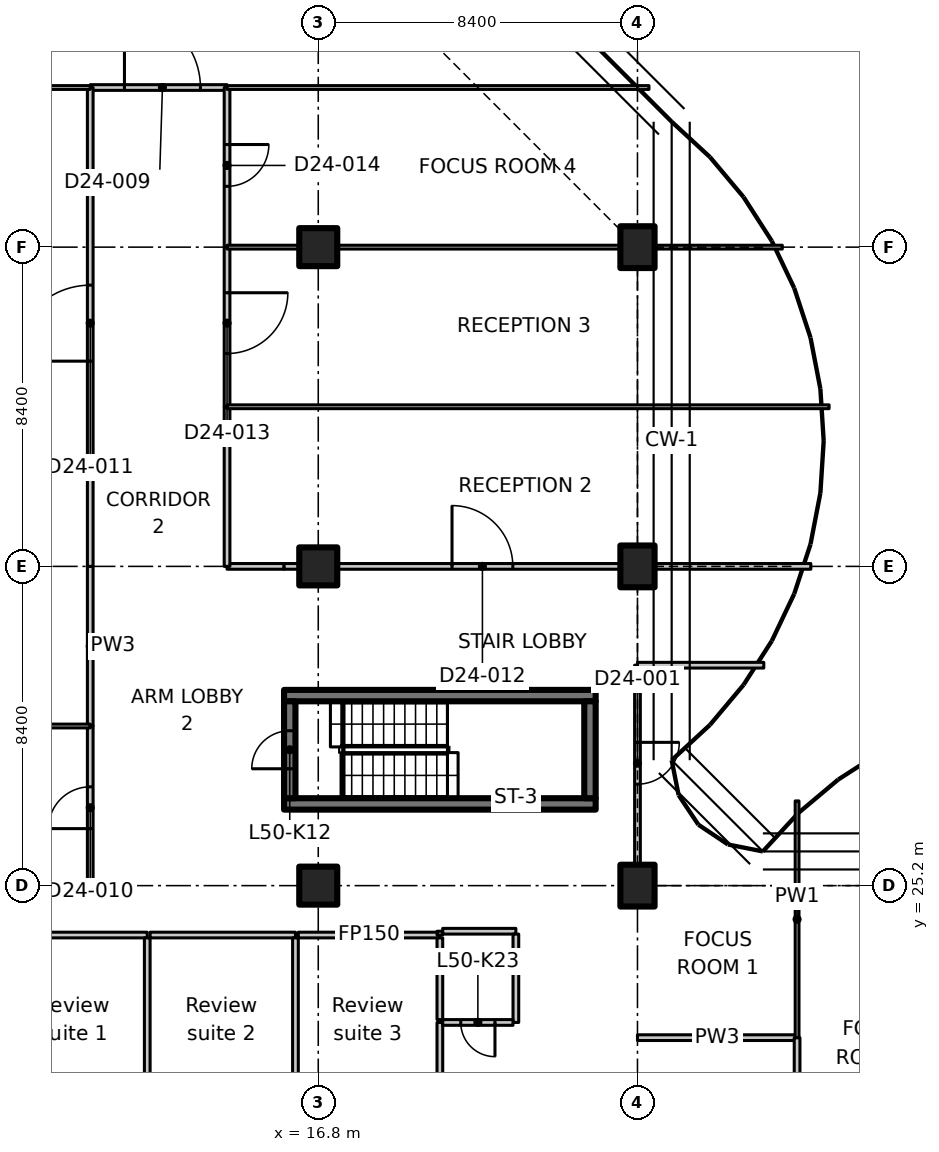
"""IFC4 building model, lengths in metres.
Left out: names, types, materials, properties, quantities, classifications, styles, units other than length and angle.
Written with IfcOpenShell. Run it as: python <this file> out.ifc"""

import sys

from ifc_helpers import new_model, si_unit, direction, frame, frame_2d, origin, origin_2d, place, context, subcontext, project, spatial, polyline, rectangle, outline, extrude, element, fill, save


model = new_model("IFC4")
c1 = context("Model", 3, precision=1e-05, world=origin(), true_north=direction((0.0, 1.0)))
c2 = subcontext(c1, "Body", "Model", "MODEL_VIEW")
j1 = project(units=[si_unit("LENGTHUNIT", "METRE"), si_unit("PLANEANGLEUNIT", "RADIAN")], contexts=[c1])
p1 = place(None, origin())
s1 = spatial("IfcSite", under=j1, at=p1, CompositionType="ELEMENT")
p2 = place(p1, origin())
s2 = spatial("IfcBuilding", under=s1, at=p2, CompositionType="ELEMENT")
p3 = place(p2, frame((0.0, 0.0, 199.2)))
s3 = spatial("IfcBuildingStorey", under=s2, at=p3, CompositionType="ELEMENT", Elevation=199.2)
for number, where, z_axis, x_axis in (
    (1, (16.8, 25.2, 0.0), (0.0, 0.0, 1.0), (1.0, 0.0, 0.0)),
    (2, (16.8, 33.6, 0.0), (0.0, 0.0, 1.0), (1.0, 0.0, 0.0)),
    (3, (16.8, 42.0, 0.0), (0.0, 0.0, 1.0), (1.0, 0.0, 0.0)),
):
    element("IfcColumn", number, at=place(p3, frame(where, z_axis=z_axis, x_axis=x_axis)), inside=s3, PredefinedType="COLUMN", context=c2, shape_type="SweptSolid", body=[
        extrude(rectangle(XDim=1.0, YDim=1.0, at=origin_2d()), origin(), (0.0, 0.0, 1.0), 3.35),
    ])
for number, where, z_axis, x_axis in (
    (4, (25.2, 25.2, 0.0), (0.0, 0.0, 1.0), (1.0, 0.0, 0.0)),
    (5, (25.2, 33.6, 0.0), (0.0, 0.0, 1.0), (1.0, 0.0, 0.0)),
    (6, (25.2, 42.0, 0.0), (0.0, 0.0, 1.0), (1.0, 0.0, 0.0)),
):
    element("IfcColumn", number, at=place(p3, frame(where, z_axis=z_axis, x_axis=x_axis)), inside=s3, PredefinedType="COLUMN", context=c2, shape_type="SweptSolid", body=[
        extrude(rectangle(XDim=0.9, YDim=1.1, at=origin_2d()), origin(), (0.0, 0.0, 1.0), 3.35),
    ])
for number, where, z_axis, x_axis in (
    (7, (15.9, 27.35, 0.0), (0.0, 0.0, 1.0), (1.0, 0.0, 0.0)),
    (8, (15.9, 30.2, 0.0), (0.0, 0.0, 1.0), (1.0, 0.0, 0.0)),
):
    element("IfcWall", number, at=place(p3, frame(where, z_axis=z_axis, x_axis=x_axis)), inside=s3, PredefinedType="SHEAR", context=c2, shape_type="SweptSolid", body=[
        extrude(rectangle(XDim=8.2, YDim=0.3, at=frame_2d((4.1, 0.0))), origin(), (0.0, 0.0, 1.0), 3.35),
    ])
p4 = place(p3, frame((16.05, 27.5, 0.0), z_axis=(0.0, 0.0, 1.0), x_axis=(0.0, 1.0, 0.0)))
e9 = element("IfcWall", 9, at=p4, inside=s3, PredefinedType="SHEAR", context=c2, shape_type="SweptSolid", body=[
    extrude(rectangle(XDim=2.55, YDim=0.3, at=frame_2d((1.275, 0.0))), origin(), (0.0, 0.0, 1.0), 3.35),
])
p5 = place(p4, frame((0.775, 0.0, 0.0)))
e10 = element("IfcOpeningElement", 10, at=p5, cuts=e9, PredefinedType="OPENING", context=c2, shape_type="SweptSolid", body=[
    extrude(rectangle(XDim=1.0, YDim=2.1, at=frame_2d((0.5, 1.05))), frame((0.0, 0.16, 0.0), z_axis=(0.0, -1.0, 0.0), x_axis=(1.0, 0.0, 0.0)), (0.0, 0.0, 1.0), 0.32),
])
p6 = place(p3, frame((23.95, 27.5, 0.0), z_axis=(0.0, 0.0, 1.0), x_axis=(0.0, 1.0, 0.0)))
e11 = element("IfcWall", 11, at=p6, inside=s3, PredefinedType="SHEAR", context=c2, shape_type="SweptSolid", body=[
    extrude(rectangle(XDim=2.55, YDim=0.3, at=frame_2d((1.275, 0.0))), origin(), (0.0, 0.0, 1.0), 3.35),
])
p7 = place(p3, frame((8.575, 23.9, 0.0), z_axis=(0.0, 0.0, 1.0), x_axis=(1.0, 0.0, 0.0)))
e12 = element("IfcWall", 12, at=p7, inside=s3, PredefinedType="PARTITIONING", context=c2, shape_type="SweptSolid", body=[
    extrude(rectangle(XDim=3.725, YDim=0.15, at=frame_2d((1.863, 0.0))), origin(), (0.0, 0.0, 1.0), 3.35),
])
p8 = place(p3, frame((12.3, 23.825, 0.0), z_axis=(0.0, 0.0, 1.0), x_axis=(0.0, -1.0, 0.0)))
e13 = element("IfcWall", 13, at=p8, inside=s3, PredefinedType="PARTITIONING", context=c2, shape_type="SweptSolid", body=[
    extrude(rectangle(XDim=4.35, YDim=0.15, at=frame_2d((2.175, 0.0))), origin(), (0.0, 0.0, 1.0), 3.35),
])
p9 = place(p3, frame((12.375, 23.9, 0.0), z_axis=(0.0, 0.0, 1.0), x_axis=(1.0, 0.0, 0.0)))
e14 = element("IfcWall", 14, at=p9, inside=s3, PredefinedType="PARTITIONING", context=c2, shape_type="SweptSolid", body=[
    extrude(rectangle(XDim=3.825, YDim=0.15, at=frame_2d((1.913, 0.0))), origin(), (0.0, 0.0, 1.0), 3.35),
])
p10 = place(p3, frame((20.0, 21.6, 0.0), z_axis=(0.0, 0.0, 1.0), x_axis=(0.0, -1.0, 0.0)))
e15 = element("IfcWall", 15, at=p10, inside=s3, PredefinedType="PARTITIONING", context=c2, shape_type="SweptSolid", body=[
    extrude(rectangle(XDim=2.2, YDim=0.15, at=frame_2d((1.1, 0.0))), origin(), (0.0, 0.0, 1.0), 3.35),
])
p11 = place(p3, frame((16.2, 23.825, 0.0), z_axis=(0.0, 0.0, 1.0), x_axis=(0.0, -1.0, 0.0)))
e16 = element("IfcWall", 16, at=p11, inside=s3, PredefinedType="PARTITIONING", context=c2, shape_type="SweptSolid", body=[
    extrude(rectangle(XDim=4.35, YDim=0.15, at=frame_2d((2.175, 0.0))), origin(), (0.0, 0.0, 1.0), 3.35),
])
p12 = place(p3, frame((16.275, 23.9, 0.0), z_axis=(0.0, 0.0, 1.0), x_axis=(1.0, 0.0, 0.0)))
e17 = element("IfcWall", 17, at=p12, inside=s3, PredefinedType="PARTITIONING", context=c2, shape_type="SweptSolid", body=[
    extrude(rectangle(XDim=3.725, YDim=0.15, at=frame_2d((1.863, 0.0))), origin(), (0.0, 0.0, 1.0), 3.35),
])
p13 = place(p3, frame((20.0, 23.9, 0.0), z_axis=(0.0, 0.0, 1.0), x_axis=(0.0, 1.0, 0.0)))
e18 = element("IfcWall", 18, at=p13, inside=s3, PredefinedType="PARTITIONING", context=c2, shape_type="SweptSolid", body=[
    extrude(rectangle(XDim=0.1, YDim=0.15, at=frame_2d((0.05, 0.0))), origin(), (0.0, 0.0, 1.0), 3.35),
])
p14 = place(p3, frame((20.075, 24.0, 0.0), z_axis=(0.0, 0.0, 1.0), x_axis=(1.0, 0.0, 0.0)))
e19 = element("IfcWall", 19, at=p14, inside=s3, PredefinedType="PARTITIONING", context=c2, shape_type="SweptSolid", body=[
    extrude(rectangle(XDim=1.925, YDim=0.15, at=frame_2d((0.962, 0.0))), origin(), (0.0, 0.0, 1.0), 3.35),
])
p15 = place(p3, frame((22.0, 23.925, 0.0), z_axis=(0.0, 0.0, 1.0), x_axis=(0.0, -1.0, 0.0)))
e20 = element("IfcWall", 20, at=p15, inside=s3, PredefinedType="PARTITIONING", context=c2, shape_type="SweptSolid", body=[
    extrude(rectangle(XDim=2.325, YDim=0.15, at=frame_2d((1.163, 0.0))), origin(), (0.0, 0.0, 1.0), 3.35),
])
p16 = place(p3, frame((21.925, 21.6, 0.0), z_axis=(0.0, 0.0, 1.0), x_axis=(-1.0, 0.0, 0.0)))
e21 = element("IfcWall", 21, at=p16, inside=s3, PredefinedType="PARTITIONING", context=c2, shape_type="SweptSolid", body=[
    extrude(rectangle(XDim=1.85, YDim=0.15, at=frame_2d((0.925, 0.0))), origin(), (0.0, 0.0, 1.0), 3.35),
])
p17 = place(p16, frame((0.475, 0.0, 0.0)))
e22 = element("IfcOpeningElement", 22, at=p17, cuts=e21, PredefinedType="OPENING", context=c2, shape_type="SweptSolid", body=[
    extrude(rectangle(XDim=0.9, YDim=2.1, at=frame_2d((0.45, 1.05))), frame((0.0, 0.085, 0.0), z_axis=(0.0, -1.0, 0.0), x_axis=(1.0, 0.0, 0.0)), (0.0, 0.0, 1.0), 0.17),
])
p18 = place(p3, frame((20.0, 21.675, 0.0), z_axis=(0.0, 0.0, 1.0), x_axis=(0.0, 1.0, 0.0)))
e23 = element("IfcWall", 23, at=p18, inside=s3, PredefinedType="PARTITIONING", context=c2, shape_type="SweptSolid", body=[
    extrude(rectangle(XDim=2.15, YDim=0.15, at=frame_2d((1.075, 0.0))), origin(), (0.0, 0.0, 1.0), 3.35),
])
p19 = place(p3, frame((25.2, 21.2, 0.0), z_axis=(0.0, 0.0, 1.0), x_axis=(1.0, 0.0, 0.0)))
e24 = element("IfcWall", 24, at=p19, inside=s3, PredefinedType="PARTITIONING", context=c2, shape_type="SweptSolid", body=[
    extrude(rectangle(XDim=4.2, YDim=0.15, at=frame_2d((2.1, 0.0))), origin(), (0.0, 0.0, 1.0), 3.33),
])
p20 = place(p3, frame((29.4, 21.2, 0.0), z_axis=(0.0, 0.0, 1.0), x_axis=(0.0, -1.0, 0.0)))
e25 = element("IfcWall", 25, at=p20, inside=s3, PredefinedType="PARTITIONING", context=c2, shape_type="SweptSolid", body=[
    extrude(rectangle(XDim=8.2, YDim=0.15, at=frame_2d((4.1, 0.0))), origin(), (0.0, 0.0, 1.0), 3.33),
])
p21 = place(p3, frame((29.4, 27.429, 0.0), z_axis=(0.0, 0.0, 1.0), x_axis=(0.0, -1.0, 0.0)))
e26 = element("IfcWall", 26, at=p21, inside=s3, PredefinedType="PARTITIONING", context=c2, shape_type="SweptSolid", body=[
    extrude(outline(polyline([(0.0, 0.0), (6.229, 0.0), (6.229, 3.33), (2.679, 3.33), (2.677, 2.98), (1.781, 2.98), (1.779, 3.33), (0.154, 3.33), (0.0, 3.33), (0.0, 0.0)])), frame((0.0, 0.05, 0.0), z_axis=(0.0, -1.0, 0.0), x_axis=(1.0, 0.0, 0.0)), (0.0, 0.0, 1.0), 0.1),
])
p22 = place(p3, frame((25.2, 31.0, 0.0), z_axis=(0.0, 0.0, 1.0), x_axis=(0.0, -1.0, 0.0)))
e27 = element("IfcWall", 27, at=p22, inside=s3, PredefinedType="PARTITIONING", context=c2, shape_type="SweptSolid", body=[
    extrude(outline(polyline([(0.0, 0.0), (5.23, 0.0), (5.23, 2.98), (0.0, 2.98), (0.0, 0.0)])), frame((0.0, 0.075, 0.0), z_axis=(0.0, -1.0, 0.0), x_axis=(1.0, 0.0, 0.0)), (0.0, 0.0, 1.0), 0.15),
])
p23 = place(p22, frame((2.03, 0.0, 0.0)))
e28 = element("IfcOpeningElement", 28, at=p23, cuts=e27, PredefinedType="OPENING", context=c2, shape_type="SweptSolid", body=[
    extrude(rectangle(XDim=1.1, YDim=2.1, at=frame_2d((0.55, 1.05))), frame((0.0, 0.085, 0.0), z_axis=(0.0, -1.0, 0.0), x_axis=(1.0, 0.0, 0.0)), (0.0, 0.0, 1.0), 0.17),
])
p24 = place(p3, frame((25.2, 31.0, 0.0), z_axis=(0.0, 0.0, 1.0), x_axis=(1.0, 0.0, 0.0)))
e29 = element("IfcWall", 29, at=p24, inside=s3, PredefinedType="PARTITIONING", context=c2, shape_type="SweptSolid", body=[
    extrude(rectangle(XDim=3.324, YDim=0.15, at=frame_2d((1.662, 0.0))), origin(), (0.0, 0.0, 1.0), 2.98),
])
p25 = place(p3, frame((10.8, 25.2, 0.0), z_axis=(0.0, 0.0, 1.0), x_axis=(0.0, 1.0, 0.0)))
e30 = element("IfcWall", 30, at=p25, inside=s3, PredefinedType="PARTITIONING", context=c2, shape_type="SweptSolid", body=[
    extrude(rectangle(XDim=4.2, YDim=0.15, at=frame_2d((2.1, 0.0))), origin(), (0.0, 0.0, 1.0), 3.33),
])
p26 = place(p25, frame((1.5, 0.0, 0.0)))
e31 = element("IfcOpeningElement", 31, at=p26, cuts=e30, PredefinedType="OPENING", context=c2, shape_type="SweptSolid", body=[
    extrude(rectangle(XDim=1.1, YDim=2.1, at=frame_2d((0.55, 1.05))), frame((0.0, 0.085, 0.0), z_axis=(0.0, -1.0, 0.0), x_axis=(1.0, 0.0, 0.0)), (0.0, 0.0, 1.0), 0.17),
])
p27 = place(p3, frame((10.8, 29.4, 0.0), z_axis=(0.0, 0.0, 1.0), x_axis=(0.0, 1.0, 0.0)))
e32 = element("IfcWall", 32, at=p27, inside=s3, PredefinedType="PARTITIONING", context=c2, shape_type="SweptSolid", body=[
    extrude(rectangle(XDim=4.2, YDim=0.15, at=frame_2d((2.1, 0.0))), origin(), (0.0, 0.0, 1.0), 3.33),
])
p28 = place(p3, frame((14.4, 33.6, 0.0), z_axis=(0.0, 0.0, 1.0), x_axis=(1.0, 0.0, 0.0)))
e33 = element("IfcWall", 33, at=p28, inside=s3, PredefinedType="PARTITIONING", context=c2, shape_type="SweptSolid", body=[
    extrude(rectangle(XDim=1.5, YDim=0.15, at=frame_2d((0.75, 0.0))), origin(), (0.0, 0.0, 1.0), 3.33),
])
p29 = place(p3, frame((15.9, 33.6, 0.0), z_axis=(0.0, 0.0, 1.0), x_axis=(1.0, 0.0, 0.0)))
e34 = element("IfcWall", 34, at=p29, inside=s3, PredefinedType="PARTITIONING", context=c2, shape_type="SweptSolid", body=[
    extrude(rectangle(XDim=0.38, YDim=0.15, at=frame_2d((0.19, 0.0))), origin(), (0.0, 0.0, 1.0), 3.33),
])
p30 = place(p3, frame((17.32, 33.6, 0.0), z_axis=(0.0, 0.0, 1.0), x_axis=(1.0, 0.0, 0.0)))
e35 = element("IfcWall", 35, at=p30, inside=s3, PredefinedType="PARTITIONING", context=c2, shape_type="SweptSolid", body=[
    extrude(rectangle(XDim=7.41, YDim=0.15, at=frame_2d((3.705, 0.0))), origin(), (0.0, 0.0, 1.0), 3.33),
])
p31 = place(p30, frame((3.0, 0.0, 0.0)))
e36 = element("IfcOpeningElement", 36, at=p31, cuts=e35, PredefinedType="OPENING", context=c2, shape_type="SweptSolid", body=[
    extrude(rectangle(XDim=1.6, YDim=2.1, at=frame_2d((0.8, 1.05))), frame((0.0, 0.085, 0.0), z_axis=(0.0, -1.0, 0.0), x_axis=(1.0, 0.0, 0.0)), (0.0, 0.0, 1.0), 0.17),
])
p32 = place(p3, frame((25.67, 33.6, 0.0), z_axis=(0.0, 0.0, 1.0), x_axis=(1.0, 0.0, 0.0)))
e37 = element("IfcWall", 37, at=p32, inside=s3, PredefinedType="PARTITIONING", context=c2, shape_type="SweptSolid", body=[
    extrude(rectangle(XDim=4.092, YDim=0.15, at=frame_2d((2.046, 0.0))), origin(), (0.0, 0.0, 1.0), 2.98),
])
p33 = place(p3, frame((10.8, 46.2, 0.0), z_axis=(0.0, 0.0, 1.0), x_axis=(1.0, 0.0, 0.0)))
e38 = element("IfcWall", 38, at=p33, inside=s3, PredefinedType="PARTITIONING", context=c2, shape_type="SweptSolid", body=[
    extrude(rectangle(XDim=3.6, YDim=0.15, at=frame_2d((1.8, 0.0))), origin(), (0.0, 0.0, 1.0), 3.33),
])
p34 = place(p33, frame((0.9, 0.0, 0.0)))
e39 = element("IfcOpeningElement", 39, at=p34, cuts=e38, PredefinedType="OPENING", context=c2, shape_type="SweptSolid", body=[
    extrude(rectangle(XDim=2.0, YDim=2.4, at=frame_2d((1.0, 1.2))), frame((0.0, 0.085, 0.0), z_axis=(0.0, -1.0, 0.0), x_axis=(1.0, 0.0, 0.0)), (0.0, 0.0, 1.0), 0.17),
])
p35 = place(p3, frame((10.8, 33.6, 0.0), z_axis=(0.0, 0.0, 1.0), x_axis=(0.0, 1.0, 0.0)))
e40 = element("IfcWall", 40, at=p35, inside=s3, PredefinedType="PARTITIONING", context=c2, shape_type="SweptSolid", body=[
    extrude(rectangle(XDim=12.6, YDim=0.15, at=frame_2d((6.3, 0.0))), origin(), (0.0, 0.0, 1.0), 3.33),
])
p36 = place(p35, frame((5.4, 0.0, 0.0)))
e41 = element("IfcOpeningElement", 41, at=p36, cuts=e40, PredefinedType="OPENING", context=c2, shape_type="SweptSolid", body=[
    extrude(rectangle(XDim=2.0, YDim=2.4, at=frame_2d((1.0, 1.2))), frame((0.0, 0.085, 0.0), z_axis=(0.0, -1.0, 0.0), x_axis=(1.0, 0.0, 0.0)), (0.0, 0.0, 1.0), 0.17),
])
p37 = place(p3, frame((14.4, 37.8, 0.0), z_axis=(0.0, 0.0, 1.0), x_axis=(0.0, -1.0, 0.0)))
e42 = element("IfcWall", 42, at=p37, inside=s3, PredefinedType="PARTITIONING", context=c2, shape_type="SweptSolid", body=[
    extrude(rectangle(XDim=4.2, YDim=0.15, at=frame_2d((2.1, 0.0))), origin(), (0.0, 0.0, 1.0), 3.33),
])
p38 = place(p3, frame((14.4, 42.0, 0.0), z_axis=(0.0, 0.0, 1.0), x_axis=(0.0, -1.0, 0.0)))
e43 = element("IfcWall", 43, at=p38, inside=s3, PredefinedType="PARTITIONING", context=c2, shape_type="SweptSolid", body=[
    extrude(rectangle(XDim=4.2, YDim=0.15, at=frame_2d((2.1, 0.0))), origin(), (0.0, 0.0, 1.0), 3.33),
])
p39 = place(p38, frame((1.2, 0.0, 0.0)))
e44 = element("IfcOpeningElement", 44, at=p39, cuts=e43, PredefinedType="OPENING", context=c2, shape_type="SweptSolid", body=[
    extrude(rectangle(XDim=1.6, YDim=2.1, at=frame_2d((0.8, 1.05))), frame((0.0, 0.085, 0.0), z_axis=(0.0, -1.0, 0.0), x_axis=(1.0, 0.0, 0.0)), (0.0, 0.0, 1.0), 0.17),
])
p40 = place(p3, frame((14.4, 46.2, 0.0), z_axis=(0.0, 0.0, 1.0), x_axis=(0.0, -1.0, 0.0)))
e45 = element("IfcWall", 45, at=p40, inside=s3, PredefinedType="PARTITIONING", context=c2, shape_type="SweptSolid", body=[
    extrude(rectangle(XDim=4.2, YDim=0.15, at=frame_2d((2.1, 0.0))), origin(), (0.0, 0.0, 1.0), 3.33),
])
p41 = place(p40, frame((1.5, 0.0, 0.0)))
e46 = element("IfcOpeningElement", 46, at=p41, cuts=e45, PredefinedType="OPENING", context=c2, shape_type="SweptSolid", body=[
    extrude(rectangle(XDim=1.1, YDim=2.1, at=frame_2d((0.55, 1.05))), frame((0.0, 0.085, 0.0), z_axis=(0.0, -1.0, 0.0), x_axis=(1.0, 0.0, 0.0)), (0.0, 0.0, 1.0), 0.17),
])
p42 = place(p3, frame((10.8, 46.2, 0.0), z_axis=(0.0, 0.0, 1.0), x_axis=(-1.0, 0.0, 0.0)))
e47 = element("IfcWall", 47, at=p42, inside=s3, PredefinedType="PARTITIONING", context=c2, shape_type="SweptSolid", body=[
    extrude(outline(polyline([(0.0, 0.0), (6.565, 0.0), (6.565, 3.33), (6.3, 3.33), (5.65, 3.33), (5.648, 2.98), (4.752, 2.98), (4.75, 3.33), (0.0, 3.33), (0.0, 0.0)])), frame((0.0, 0.05, 0.0), z_axis=(0.0, -1.0, 0.0), x_axis=(1.0, 0.0, 0.0)), (0.0, 0.0, 1.0), 0.1),
])
p43 = place(p3, frame((25.502, 46.2, 0.0), z_axis=(0.0, 0.0, 1.0), x_axis=(-1.0, 0.0, 0.0)))
e48 = element("IfcWall", 48, at=p43, inside=s3, PredefinedType="PARTITIONING", context=c2, shape_type="SweptSolid", body=[
    extrude(outline(polyline([(0.0, 0.0), (11.103, 0.0), (11.103, 3.33), (5.168, 3.33), (5.166, 2.98), (3.839, 2.98), (3.837, 3.33), (0.103, 3.33), (0.0, 3.33), (0.0, 0.0)])), frame((0.0, 0.05, 0.0), z_axis=(0.0, -1.0, 0.0), x_axis=(1.0, 0.0, 0.0)), (0.0, 0.0, 1.0), 0.1),
])
p44 = place(p3, frame((-1.609, 29.4, 0.0), z_axis=(0.0, 0.0, 1.0), x_axis=(1.0, 0.0, 0.0)))
e49 = element("IfcWall", 49, at=p44, inside=s3, PredefinedType="PARTITIONING", context=c2, shape_type="SweptSolid", body=[
    extrude(outline(polyline([(0.0, 0.0), (12.409, 0.0), (12.409, 3.33), (2.059, 3.33), (2.057, 2.98), (1.161, 2.98), (1.159, 3.33), (0.509, 3.33), (0.0, 3.33), (0.0, 0.0)])), frame((0.0, 0.05, 0.0), z_axis=(0.0, -1.0, 0.0), x_axis=(1.0, 0.0, 0.0)), (0.0, 0.0, 1.0), 0.1),
])
p45 = place(p3, frame((14.4, 37.8, 0.0), z_axis=(0.0, 0.0, 1.0), x_axis=(1.0, 0.0, 0.0)))
e50 = element("IfcWall", 50, at=p45, inside=s3, PredefinedType="PARTITIONING", context=c2, shape_type="SweptSolid", body=[
    extrude(outline(polyline([(0.0, 0.0), (15.843, 0.0), (15.843, 3.33), (11.25, 3.33), (11.248, 2.98), (10.352, 2.98), (10.35, 3.33), (0.0, 3.33), (0.0, 0.0)])), frame((0.0, 0.05, 0.0), z_axis=(0.0, -1.0, 0.0), x_axis=(1.0, 0.0, 0.0)), (0.0, 0.0, 1.0), 0.1),
])
p46 = place(p3, frame((14.4, 42.0, 0.0), z_axis=(0.0, 0.0, 1.0), x_axis=(1.0, 0.0, 0.0)))
e51 = element("IfcWall", 51, at=p46, inside=s3, PredefinedType="PARTITIONING", context=c2, shape_type="SweptSolid", body=[
    extrude(rectangle(XDim=1.88, YDim=0.1, at=frame_2d((0.94, 0.0))), origin(), (0.0, 0.0, 1.0), 3.33),
])
p47 = place(p3, frame((17.32, 42.0, 0.0), z_axis=(0.0, 0.0, 1.0), x_axis=(1.0, 0.0, 0.0)))
e52 = element("IfcWall", 52, at=p47, inside=s3, PredefinedType="PARTITIONING", context=c2, shape_type="SweptSolid", body=[
    extrude(outline(polyline([(0.0, 0.0), (7.41, 0.0), (7.41, 2.98), (7.216, 2.98), (7.214, 3.33), (0.0, 3.33), (0.0, 0.0)])), frame((0.0, 0.05, 0.0), z_axis=(0.0, -1.0, 0.0), x_axis=(1.0, 0.0, 0.0)), (0.0, 0.0, 1.0), 0.1),
])
p48 = place(p3, frame((25.67, 42.0, 0.0), z_axis=(0.0, 0.0, 1.0), x_axis=(1.0, 0.0, 0.0)))
e53 = element("IfcWall", 53, at=p48, inside=s3, PredefinedType="PARTITIONING", context=c2, shape_type="SweptSolid", body=[
    extrude(rectangle(XDim=3.342, YDim=0.1, at=frame_2d((1.671, 0.0))), origin(), (0.0, 0.0, 1.0), 2.98),
])
p49 = place(p5, origin())
e54 = element("IfcDoor", 54, at=p49, inside=s3, OperationType="SINGLE_SWING_LEFT", PredefinedType="DOOR", context=c2, shape_type="SweptSolid", body=[
    extrude(rectangle(XDim=1.0, YDim=2.1, at=frame_2d((0.5, 1.05))), frame((0.0, 0.025, 0.0), z_axis=(0.0, -1.0, 0.0), x_axis=(1.0, 0.0, 0.0)), (0.0, 0.0, 1.0), 0.05),
])
fill(e10, e54)
p50 = place(p17, origin())
e55 = element("IfcDoor", 55, at=p50, inside=s3, OperationType="SINGLE_SWING_RIGHT", PredefinedType="DOOR", context=c2, shape_type="SweptSolid", body=[
    extrude(rectangle(XDim=0.9, YDim=2.1, at=frame_2d((0.45, 1.05))), frame((0.0, 0.025, 0.0), z_axis=(0.0, -1.0, 0.0), x_axis=(1.0, 0.0, 0.0)), (0.0, 0.0, 1.0), 0.05),
])
fill(e22, e55)
p51 = place(p23, origin())
e56 = element("IfcDoor", 56, at=p51, inside=s3, OperationType="SINGLE_SWING_RIGHT", PredefinedType="DOOR", context=c2, shape_type="SweptSolid", body=[
    extrude(rectangle(XDim=1.1, YDim=2.1, at=frame_2d((0.55, 1.05))), frame((0.0, 0.025, 0.0), z_axis=(0.0, -1.0, 0.0), x_axis=(1.0, 0.0, 0.0)), (0.0, 0.0, 1.0), 0.05),
])
fill(e28, e56)
p52 = place(p34, origin())
e57 = element("IfcDoor", 57, at=p52, inside=s3, OperationType="DOUBLE_DOOR_SINGLE_SWING", PredefinedType="DOOR", context=c2, shape_type="SweptSolid", body=[
    extrude(rectangle(XDim=2.0, YDim=2.4, at=frame_2d((1.0, 1.2))), frame((0.0, 0.025, 0.0), z_axis=(0.0, -1.0, 0.0), x_axis=(1.0, 0.0, 0.0)), (0.0, 0.0, 1.0), 0.05),
])
fill(e39, e57)
p53 = place(p26, origin())
e58 = element("IfcDoor", 58, at=p53, inside=s3, OperationType="SINGLE_SWING_LEFT", PredefinedType="DOOR", context=c2, shape_type="SweptSolid", body=[
    extrude(rectangle(XDim=1.1, YDim=2.1, at=frame_2d((0.55, 1.05))), frame((0.0, 0.025, 0.0), z_axis=(0.0, -1.0, 0.0), x_axis=(1.0, 0.0, 0.0)), (0.0, 0.0, 1.0), 0.05),
])
fill(e31, e58)
p54 = place(p36, origin())
e59 = element("IfcDoor", 59, at=p54, inside=s3, OperationType="DOUBLE_DOOR_SINGLE_SWING", PredefinedType="DOOR", context=c2, shape_type="SweptSolid", body=[
    extrude(rectangle(XDim=2.0, YDim=2.4, at=frame_2d((1.0, 1.2))), frame((0.0, 0.025, 0.0), z_axis=(0.0, -1.0, 0.0), x_axis=(1.0, 0.0, 0.0)), (0.0, 0.0, 1.0), 0.05),
])
fill(e41, e59)
p55 = place(p31, origin())
e60 = element("IfcDoor", 60, at=p55, inside=s3, OperationType="DOUBLE_DOOR_SINGLE_SWING", PredefinedType="DOOR", context=c2, shape_type="SweptSolid", body=[
    extrude(rectangle(XDim=1.6, YDim=2.1, at=frame_2d((0.8, 1.05))), frame((0.0, 0.025, 0.0), z_axis=(0.0, -1.0, 0.0), x_axis=(1.0, 0.0, 0.0)), (0.0, 0.0, 1.0), 0.05),
])
fill(e36, e60)
p56 = place(p39, origin())
e61 = element("IfcDoor", 61, at=p56, inside=s3, OperationType="DOUBLE_DOOR_SINGLE_SWING", PredefinedType="DOOR", context=c2, shape_type="SweptSolid", body=[
    extrude(rectangle(XDim=1.6, YDim=2.1, at=frame_2d((0.8, 1.05))), frame((0.0, 0.025, 0.0), z_axis=(0.0, -1.0, 0.0), x_axis=(1.0, 0.0, 0.0)), (0.0, 0.0, 1.0), 0.05),
])
fill(e44, e61)
p57 = place(p41, origin())
e62 = element("IfcDoor", 62, at=p57, inside=s3, OperationType="SINGLE_SWING_LEFT", PredefinedType="DOOR", context=c2, shape_type="SweptSolid", body=[
    extrude(rectangle(XDim=1.1, YDim=2.1, at=frame_2d((0.55, 1.05))), frame((0.0, 0.025, 0.0), z_axis=(0.0, -1.0, 0.0), x_axis=(1.0, 0.0, 0.0)), (0.0, 0.0, 1.0), 0.05),
])
fill(e46, e62)
save(model, sys.argv[1])
